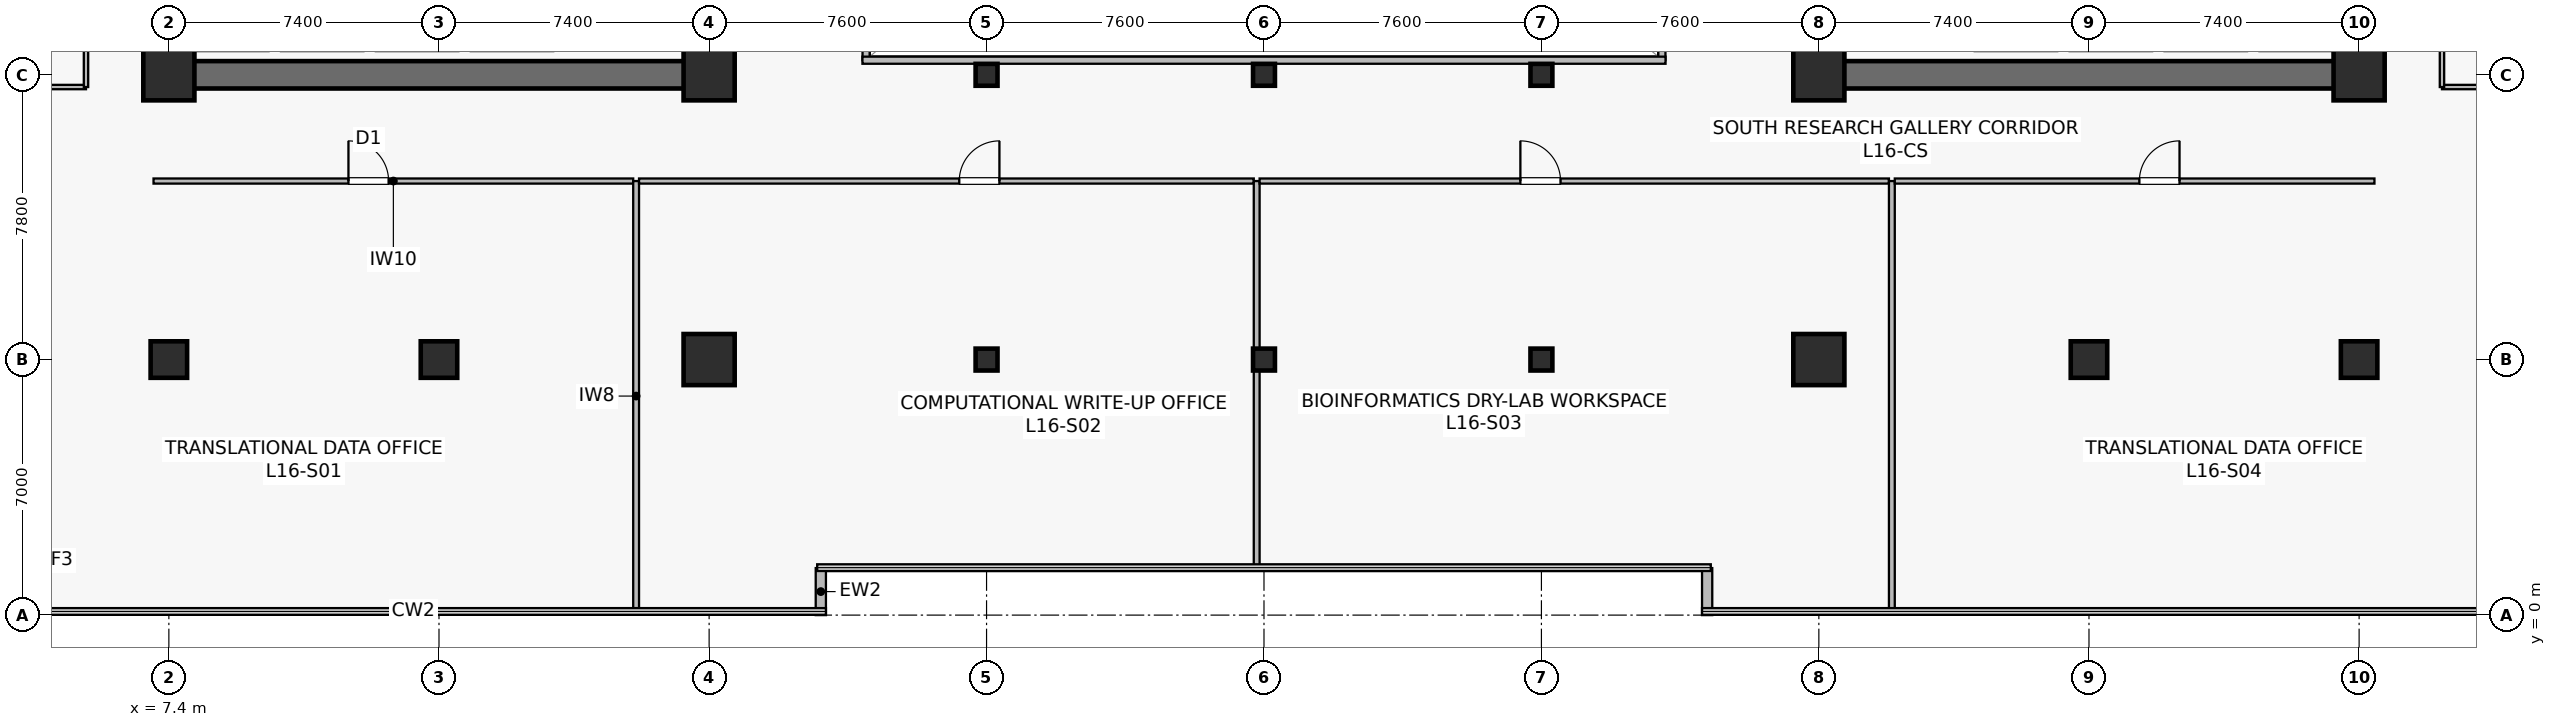
"""IFC4 building model, lengths in metres.
Left out: names, types, materials, properties, quantities, classifications, styles, units other than length and angle.
Written with IfcOpenShell. Run it as: python <this file> out.ifc"""

import sys

from ifc_helpers import new_model, si_unit, direction, frame, frame_2d, origin, origin_2d, place, context, subcontext, project, spatial, rectangle, hollow_rectangle, extrude, source, transform, mapped, element, fill, save


model = new_model("IFC4")
c1 = context("Model", 3, precision=1e-05, world=origin(), true_north=direction((0.0, 1.0)))
c2 = subcontext(c1, "Body", "Model", "MODEL_VIEW")
j1 = project(units=[si_unit("LENGTHUNIT", "METRE"), si_unit("PLANEANGLEUNIT", "RADIAN")], contexts=[c1])
p1 = place(None, origin())
s1 = spatial("IfcSite", under=j1, at=p1, CompositionType="ELEMENT")
p2 = place(p1, origin())
s2 = spatial("IfcBuilding", under=s1, at=p2, CompositionType="ELEMENT")
p3 = place(p2, frame((0.0, 0.0, 66.2)))
s3 = spatial("IfcBuildingStorey", under=s2, at=p3, CompositionType="ELEMENT", Elevation=66.2)
p4 = place(p3, frame((7.025, 14.8, 0.0), z_axis=(0.0, 0.0, 1.0), x_axis=(1.0, 0.0, 0.0)))
e1 = element("IfcWall", 1, at=p4, inside=s3, PredefinedType="SHEAR", context=c2, shape_type="SweptSolid", body=[
    extrude(rectangle(XDim=15.55, YDim=0.75, at=frame_2d((7.775, 0.0))), origin(), (0.0, 0.0, 1.0), 3.78),
])
p5 = place(p3, frame((7.4, 15.175, 0.0), z_axis=(0.0, 0.0, 1.0), x_axis=(0.0, 1.0, 0.0)))
e2 = element("IfcWall", 2, at=p5, inside=s3, PredefinedType="SHEAR", context=c2, shape_type="SweptSolid", body=[
    extrude(rectangle(XDim=18.25, YDim=0.75, at=frame_2d((9.125, 0.0))), origin(), (0.0, 0.0, 1.0), 3.78),
])
p6 = place(p3, frame((22.2, 15.175, 0.0), z_axis=(0.0, 0.0, 1.0), x_axis=(0.0, 1.0, 0.0)))
e3 = element("IfcWall", 3, at=p6, inside=s3, PredefinedType="SHEAR", context=c2, shape_type="SweptSolid", body=[
    extrude(rectangle(XDim=18.25, YDim=0.75, at=frame_2d((9.125, 0.0))), origin(), (0.0, 0.0, 1.0), 3.78),
])
p7 = place(p6, frame((3.375, 0.0, 0.0)))
e4 = element("IfcOpeningElement", 4, at=p7, cuts=e3, PredefinedType="OPENING", context=c2, shape_type="SweptSolid", body=[
    extrude(rectangle(XDim=1.42, YDim=2.2, at=frame_2d((0.71, 1.1))), frame((0.0, 0.385, 0.0), z_axis=(0.0, -1.0, 0.0), x_axis=(1.0, 0.0, 0.0)), (0.0, 0.0, 1.0), 0.77),
])
p8 = place(p3, frame((52.225, 14.8, 0.0), z_axis=(0.0, 0.0, 1.0), x_axis=(1.0, 0.0, 0.0)))
e5 = element("IfcWall", 5, at=p8, inside=s3, PredefinedType="SHEAR", context=c2, shape_type="SweptSolid", body=[
    extrude(rectangle(XDim=15.55, YDim=0.75, at=frame_2d((7.775, 0.0))), origin(), (0.0, 0.0, 1.0), 3.78),
])
p9 = place(p3, frame((52.6, 15.175, 0.0), z_axis=(0.0, 0.0, 1.0), x_axis=(0.0, 1.0, 0.0)))
e6 = element("IfcWall", 6, at=p9, inside=s3, PredefinedType="SHEAR", context=c2, shape_type="SweptSolid", body=[
    extrude(rectangle(XDim=18.25, YDim=0.75, at=frame_2d((9.125, 0.0))), origin(), (0.0, 0.0, 1.0), 3.78),
])
p10 = place(p9, frame((3.375, 0.0, 0.0)))
e7 = element("IfcOpeningElement", 7, at=p10, cuts=e6, PredefinedType="OPENING", context=c2, shape_type="SweptSolid", body=[
    extrude(rectangle(XDim=1.42, YDim=2.2, at=frame_2d((0.71, 1.1))), frame((0.0, 0.385, 0.0), z_axis=(0.0, -1.0, 0.0), x_axis=(1.0, 0.0, 0.0)), (0.0, 0.0, 1.0), 0.77),
])
p11 = place(p3, frame((67.4, 15.175, 0.0), z_axis=(0.0, 0.0, 1.0), x_axis=(0.0, 1.0, 0.0)))
e8 = element("IfcWall", 8, at=p11, inside=s3, PredefinedType="SHEAR", context=c2, shape_type="SweptSolid", body=[
    extrude(rectangle(XDim=18.25, YDim=0.75, at=frame_2d((9.125, 0.0))), origin(), (0.0, 0.0, 1.0), 3.78),
])
m1 = source(origin(), c2, "Body", "SweptSolid", [
    extrude(rectangle(XDim=1.0, YDim=1.0, at=origin_2d()), origin(), (0.0, 0.0, 1.0), 4.1),
])
p12 = place(p3, frame((14.8, 7.0, 0.0), z_axis=(0.0, 0.0, 1.0), x_axis=(1.0, 0.0, 0.0)))
e9 = element("IfcColumn", 9, at=p12, inside=s3, PredefinedType="COLUMN", context=c2, shape_type="MappedRepresentation", body=[
    mapped(m1, transform((0.0, 0.0, 0.0), scale=1.0)),
])
m2 = source(origin(), c2, "Body", "SweptSolid", [
    extrude(rectangle(XDim=1.4, YDim=1.4, at=origin_2d()), origin(), (0.0, 0.0, 1.0), 4.1),
])
for number, where, z_axis, x_axis in (
    (10, (22.2, 7.0, 0.0), (0.0, 0.0, 1.0), (1.0, 0.0, 0.0)),
    (11, (7.4, 14.8, 0.0), (0.0, 0.0, 1.0), (1.0, 0.0, 0.0)),
    (12, (22.2, 14.8, 0.0), (0.0, 0.0, 1.0), (1.0, 0.0, 0.0)),
    (13, (52.6, 7.0, 0.0), (0.0, 0.0, 1.0), (1.0, 0.0, 0.0)),
):
    element("IfcColumn", number, at=place(p3, frame(where, z_axis=z_axis, x_axis=x_axis)), inside=s3, PredefinedType="COLUMN", context=c2, shape_type="MappedRepresentation", body=[
        mapped(m2, transform((0.0, 0.0, 0.0), scale=1.0)),
    ])
p13 = place(p3, frame((60.0, 7.0, 0.0), z_axis=(0.0, 0.0, 1.0), x_axis=(1.0, 0.0, 0.0)))
e14 = element("IfcColumn", 14, at=p13, inside=s3, PredefinedType="COLUMN", context=c2, shape_type="MappedRepresentation", body=[
    mapped(m1, transform((0.0, 0.0, 0.0), scale=1.0)),
])
for number, where, z_axis, x_axis in (
    (15, (52.6, 14.8, 0.0), (0.0, 0.0, 1.0), (1.0, 0.0, 0.0)),
    (16, (67.4, 14.8, 0.0), (0.0, 0.0, 1.0), (1.0, 0.0, 0.0)),
):
    element("IfcColumn", number, at=place(p3, frame(where, z_axis=z_axis, x_axis=x_axis)), inside=s3, PredefinedType="COLUMN", context=c2, shape_type="MappedRepresentation", body=[
        mapped(m2, transform((0.0, 0.0, 0.0), scale=1.0)),
    ])
for number, where, z_axis, x_axis in (
    (17, (7.4, 7.0, 0.0), (0.0, 0.0, 1.0), (1.0, 0.0, 0.0)),
    (18, (67.4, 7.0, 0.0), (0.0, 0.0, 1.0), (1.0, 0.0, 0.0)),
):
    element("IfcColumn", number, at=place(p3, frame(where, z_axis=z_axis, x_axis=x_axis)), inside=s3, PredefinedType="COLUMN", context=c2, shape_type="MappedRepresentation", body=[
        mapped(m1, transform((0.0, 0.0, 0.0), scale=1.0)),
    ])
m3 = source(origin(), c2, "Body", "SweptSolid", [
    extrude(hollow_rectangle(XDim=0.6, YDim=0.6, WallThickness=0.028, at=origin_2d()), origin(), (0.0, 0.0, 1.0), 4.1),
])
for number, where, z_axis, x_axis in (
    (19, (29.8, 7.0, 0.0), (0.0, 0.0, 1.0), (1.0, 0.0, 0.0)),
    (20, (29.8, 14.8, 0.0), (0.0, 0.0, 1.0), (1.0, 0.0, 0.0)),
    (21, (37.4, 7.0, 0.0), (0.0, 0.0, 1.0), (1.0, 0.0, 0.0)),
    (22, (37.4, 14.8, 0.0), (0.0, 0.0, 1.0), (1.0, 0.0, 0.0)),
    (23, (45.0, 7.0, 0.0), (0.0, 0.0, 1.0), (1.0, 0.0, 0.0)),
    (24, (45.0, 14.8, 0.0), (0.0, 0.0, 1.0), (1.0, 0.0, 0.0)),
):
    element("IfcColumn", number, at=place(p3, frame(where, z_axis=z_axis, x_axis=x_axis)), inside=s3, PredefinedType="COLUMN", context=c2, shape_type="MappedRepresentation", body=[
        mapped(m3, transform((0.0, 0.0, 0.0), scale=1.0)),
    ])
for number, where, z_axis, x_axis in (
    (25, (25.26, 0.0, 0.0), (0.0, 0.0, 1.0), (0.0, 1.0, 0.0)),
    (26, (49.54, 1.288, 0.0), (0.0, 0.0, 1.0), (0.0, -1.0, 0.0)),
):
    element("IfcWall", number, at=place(p3, frame(where, z_axis=z_axis, x_axis=x_axis)), inside=s3, PredefinedType="STANDARD", context=c2, shape_type="SweptSolid", body=[
        extrude(rectangle(XDim=1.288, YDim=0.28, at=frame_2d((0.644, 0.0))), origin(), (0.0, 0.0, 1.0), 3.78),
    ])
p14 = place(p3, frame((26.5, 15.2, 0.0), z_axis=(0.0, 0.0, 1.0), x_axis=(0.0, 1.0, 0.0)))
e27 = element("IfcWall", 27, at=p14, inside=s3, PredefinedType="SOLIDWALL", context=c2, shape_type="SweptSolid", body=[
    extrude(rectangle(XDim=18.2, YDim=0.195, at=frame_2d((9.1, 0.0))), origin(), (0.0, 0.0, 1.0), 3.78),
])
p15 = place(p14, frame((1.8, 0.0, 0.9)))
e28 = element("IfcOpeningElement", 28, at=p15, cuts=e27, PredefinedType="OPENING", context=c2, shape_type="SweptSolid", body=[
    extrude(rectangle(XDim=1.5, YDim=1.4, at=frame_2d((0.75, 0.7))), frame((0.0, 0.107, 0.0), z_axis=(0.0, -1.0, 0.0), x_axis=(1.0, 0.0, 0.0)), (0.0, 0.0, 1.0), 0.215),
])
p16 = place(p14, frame((13.2, 0.0, 0.9)))
e29 = element("IfcOpeningElement", 29, at=p16, cuts=e27, PredefinedType="OPENING", context=c2, shape_type="SweptSolid", body=[
    extrude(rectangle(XDim=1.5, YDim=1.4, at=frame_2d((0.75, 0.7))), frame((0.0, 0.107, 0.0), z_axis=(0.0, -1.0, 0.0), x_axis=(1.0, 0.0, 0.0)), (0.0, 0.0, 1.0), 0.215),
])
p17 = place(p3, frame((48.3, 15.2, 0.0), z_axis=(0.0, 0.0, 1.0), x_axis=(0.0, 1.0, 0.0)))
e30 = element("IfcWall", 30, at=p17, inside=s3, PredefinedType="SOLIDWALL", context=c2, shape_type="SweptSolid", body=[
    extrude(rectangle(XDim=18.2, YDim=0.195, at=frame_2d((9.1, 0.0))), origin(), (0.0, 0.0, 1.0), 3.78),
])
p18 = place(p17, frame((1.8, 0.0, 0.9)))
e31 = element("IfcOpeningElement", 31, at=p18, cuts=e30, PredefinedType="OPENING", context=c2, shape_type="SweptSolid", body=[
    extrude(rectangle(XDim=1.5, YDim=1.4, at=frame_2d((0.75, 0.7))), frame((0.0, 0.107, 0.0), z_axis=(0.0, -1.0, 0.0), x_axis=(1.0, 0.0, 0.0)), (0.0, 0.0, 1.0), 0.215),
])
p19 = place(p17, frame((13.2, 0.0, 0.9)))
e32 = element("IfcOpeningElement", 32, at=p19, cuts=e30, PredefinedType="OPENING", context=c2, shape_type="SweptSolid", body=[
    extrude(rectangle(XDim=1.5, YDim=1.4, at=frame_2d((0.75, 0.7))), frame((0.0, 0.107, 0.0), z_axis=(0.0, -1.0, 0.0), x_axis=(1.0, 0.0, 0.0)), (0.0, 0.0, 1.0), 0.215),
])
p20 = place(p3, frame((26.4, 15.2, 0.0), z_axis=(0.0, 0.0, 1.0), x_axis=(1.0, 0.0, 0.0)))
e33 = element("IfcWall", 33, at=p20, inside=s3, PredefinedType="SOLIDWALL", context=c2, shape_type="SweptSolid", body=[
    extrude(rectangle(XDim=22.0, YDim=0.195, at=frame_2d((11.0, 0.0))), origin(), (0.0, 0.0, 1.0), 3.78),
])
p21 = place(p3, frame((6.98, 11.89, 0.0), z_axis=(0.0, 0.0, 1.0), x_axis=(1.0, 0.0, 0.0)))
e34 = element("IfcWall", 34, at=p21, inside=s3, PredefinedType="PARTITIONING", context=c2, shape_type="SweptSolid", body=[
    extrude(rectangle(XDim=13.14, YDim=0.14, at=frame_2d((6.57, 0.0))), origin(), (0.0, 0.0, 1.0), 3.115),
])
p22 = place(p21, frame((5.34, 0.0, 0.0)))
e35 = element("IfcOpeningElement", 35, at=p22, cuts=e34, PredefinedType="OPENING", context=c2, shape_type="SweptSolid", body=[
    extrude(rectangle(XDim=1.1, YDim=2.18, at=frame_2d((0.55, 1.09))), frame((0.0, 0.08, 0.0), z_axis=(0.0, -1.0, 0.0), x_axis=(1.0, 0.0, 0.0)), (0.0, 0.0, 1.0), 0.16),
])
p23 = place(p3, frame((20.2, 0.11, 0.0), z_axis=(0.0, 0.0, 1.0), x_axis=(0.0, 1.0, 0.0)))
e36 = element("IfcWall", 36, at=p23, inside=s3, PredefinedType="PARTITIONING", context=c2, shape_type="SweptSolid", body=[
    extrude(rectangle(XDim=11.78, YDim=0.16, at=frame_2d((5.89, 0.0))), origin(), (0.0, 0.0, 1.0), 3.015),
])
p24 = place(p3, frame((20.28, 11.89, 0.0), z_axis=(0.0, 0.0, 1.0), x_axis=(1.0, 0.0, 0.0)))
e37 = element("IfcWall", 37, at=p24, inside=s3, PredefinedType="PARTITIONING", context=c2, shape_type="SweptSolid", body=[
    extrude(rectangle(XDim=16.84, YDim=0.14, at=frame_2d((8.42, 0.0))), origin(), (0.0, 0.0, 1.0), 3.115),
])
p25 = place(p24, frame((8.772, 0.0, 0.0)))
e38 = element("IfcOpeningElement", 38, at=p25, cuts=e37, PredefinedType="OPENING", context=c2, shape_type="SweptSolid", body=[
    extrude(rectangle(XDim=1.1, YDim=2.18, at=frame_2d((0.55, 1.09))), frame((0.0, 0.08, 0.0), z_axis=(0.0, -1.0, 0.0), x_axis=(1.0, 0.0, 0.0)), (0.0, 0.0, 1.0), 0.16),
])
p26 = place(p3, frame((37.2, 1.31, 0.0), z_axis=(0.0, 0.0, 1.0), x_axis=(0.0, 1.0, 0.0)))
e39 = element("IfcWall", 39, at=p26, inside=s3, PredefinedType="PARTITIONING", context=c2, shape_type="SweptSolid", body=[
    extrude(rectangle(XDim=10.58, YDim=0.16, at=frame_2d((5.29, 0.0))), origin(), (0.0, 0.0, 1.0), 3.015),
])
p27 = place(p3, frame((37.28, 11.89, 0.0), z_axis=(0.0, 0.0, 1.0), x_axis=(1.0, 0.0, 0.0)))
e40 = element("IfcWall", 40, at=p27, inside=s3, PredefinedType="PARTITIONING", context=c2, shape_type="SweptSolid", body=[
    extrude(rectangle(XDim=17.24, YDim=0.14, at=frame_2d((8.62, 0.0))), origin(), (0.0, 0.0, 1.0), 3.115),
])
p28 = place(p27, frame((7.144, 0.0, 0.0)))
e41 = element("IfcOpeningElement", 41, at=p28, cuts=e40, PredefinedType="OPENING", context=c2, shape_type="SweptSolid", body=[
    extrude(rectangle(XDim=1.1, YDim=2.18, at=frame_2d((0.55, 1.09))), frame((0.0, 0.08, 0.0), z_axis=(0.0, -1.0, 0.0), x_axis=(1.0, 0.0, 0.0)), (0.0, 0.0, 1.0), 0.16),
])
p29 = place(p3, frame((54.6, 0.11, 0.0), z_axis=(0.0, 0.0, 1.0), x_axis=(0.0, 1.0, 0.0)))
e42 = element("IfcWall", 42, at=p29, inside=s3, PredefinedType="PARTITIONING", context=c2, shape_type="SweptSolid", body=[
    extrude(rectangle(XDim=11.78, YDim=0.16, at=frame_2d((5.89, 0.0))), origin(), (0.0, 0.0, 1.0), 3.015),
])
p30 = place(p3, frame((54.68, 11.89, 0.0), z_axis=(0.0, 0.0, 1.0), x_axis=(1.0, 0.0, 0.0)))
e43 = element("IfcWall", 43, at=p30, inside=s3, PredefinedType="PARTITIONING", context=c2, shape_type="SweptSolid", body=[
    extrude(rectangle(XDim=13.14, YDim=0.14, at=frame_2d((6.57, 0.0))), origin(), (0.0, 0.0, 1.0), 3.115),
])
p31 = place(p30, frame((6.7, 0.0, 0.0)))
e44 = element("IfcOpeningElement", 44, at=p31, cuts=e43, PredefinedType="OPENING", context=c2, shape_type="SweptSolid", body=[
    extrude(rectangle(XDim=1.1, YDim=2.18, at=frame_2d((0.55, 1.09))), frame((0.0, 0.08, 0.0), z_axis=(0.0, -1.0, 0.0), x_axis=(1.0, 0.0, 0.0)), (0.0, 0.0, 1.0), 0.16),
])
p32 = place(p3, frame((0.11, 14.465, 0.0), z_axis=(0.0, 0.0, 1.0), x_axis=(1.0, 0.0, 0.0)))
e45 = element("IfcWall", 45, at=p32, inside=s3, PredefinedType="PARTITIONING", context=c2, shape_type="SweptSolid", body=[
    extrude(rectangle(XDim=5.02, YDim=0.12, at=frame_2d((2.51, 0.0))), origin(), (0.0, 0.0, 1.0), 3.78),
])
p33 = place(p3, frame((5.13, 14.465, 0.0), z_axis=(0.0, 0.0, 1.0), x_axis=(0.0, 1.0, 0.0)))
e46 = element("IfcWall", 46, at=p33, inside=s3, PredefinedType="PARTITIONING", context=c2, shape_type="SweptSolid", body=[
    extrude(rectangle(XDim=19.67, YDim=0.12, at=frame_2d((9.835, 0.0))), origin(), (0.0, 0.0, 1.0), 3.78),
])
p34 = place(p33, frame((9.385, 0.0, 0.0)))
e47 = element("IfcOpeningElement", 47, at=p34, cuts=e46, PredefinedType="OPENING", context=c2, shape_type="SweptSolid", body=[
    extrude(rectangle(XDim=0.9, YDim=2.1, at=frame_2d((0.45, 1.05))), frame((0.0, 0.07, 0.0), z_axis=(0.0, -1.0, 0.0), x_axis=(1.0, 0.0, 0.0)), (0.0, 0.0, 1.0), 0.14),
])
p35 = place(p3, frame((69.67, 14.465, 0.0), z_axis=(0.0, 0.0, 1.0), x_axis=(1.0, 0.0, 0.0)))
e48 = element("IfcWall", 48, at=p35, inside=s3, PredefinedType="PARTITIONING", context=c2, shape_type="SweptSolid", body=[
    extrude(rectangle(XDim=5.02, YDim=0.12, at=frame_2d((2.51, 0.0))), origin(), (0.0, 0.0, 1.0), 3.78),
])
p36 = place(p3, frame((69.67, 14.465, 0.0), z_axis=(0.0, 0.0, 1.0), x_axis=(0.0, 1.0, 0.0)))
e49 = element("IfcWall", 49, at=p36, inside=s3, PredefinedType="PARTITIONING", context=c2, shape_type="SweptSolid", body=[
    extrude(rectangle(XDim=7.275, YDim=0.12, at=frame_2d((3.637, 0.0))), origin(), (0.0, 0.0, 1.0), 3.78),
])
p37 = place(p36, frame((3.188, 0.0, 0.0)))
e50 = element("IfcOpeningElement", 50, at=p37, cuts=e49, PredefinedType="OPENING", context=c2, shape_type="SweptSolid", body=[
    extrude(rectangle(XDim=0.9, YDim=2.1, at=frame_2d((0.45, 1.05))), frame((0.0, 0.07, 0.0), z_axis=(0.0, -1.0, 0.0), x_axis=(1.0, 0.0, 0.0)), (0.0, 0.0, 1.0), 0.14),
])
m4 = source(origin(), c2, "Body", "SweptSolid", [
    extrude(rectangle(XDim=1.1, YDim=2.18, at=frame_2d((0.55, 1.09))), frame((0.0, 0.025, 0.0), z_axis=(0.0, -1.0, 0.0), x_axis=(1.0, 0.0, 0.0)), (0.0, 0.0, 1.0), 0.05),
])
p38 = place(p22, origin())
e51 = element("IfcDoor", 51, at=p38, inside=s3, OperationType="SINGLE_SWING_LEFT", PredefinedType="DOOR", context=c2, shape_type="MappedRepresentation", body=[
    mapped(m4, transform((0.0, 0.0, 0.0), scale=1.0)),
])
fill(e35, e51)
p39 = place(p25, origin())
e52 = element("IfcDoor", 52, at=p39, inside=s3, OperationType="SINGLE_SWING_RIGHT", PredefinedType="DOOR", context=c2, shape_type="MappedRepresentation", body=[
    mapped(m4, transform((0.0, 0.0, 0.0), scale=1.0)),
])
fill(e38, e52)
p40 = place(p28, origin())
e53 = element("IfcDoor", 53, at=p40, inside=s3, OperationType="SINGLE_SWING_LEFT", PredefinedType="DOOR", context=c2, shape_type="MappedRepresentation", body=[
    mapped(m4, transform((0.0, 0.0, 0.0), scale=1.0)),
])
fill(e41, e53)
p41 = place(p31, origin())
e54 = element("IfcDoor", 54, at=p41, inside=s3, OperationType="SINGLE_SWING_RIGHT", PredefinedType="DOOR", context=c2, shape_type="MappedRepresentation", body=[
    mapped(m4, transform((0.0, 0.0, 0.0), scale=1.0)),
])
fill(e44, e54)
save(model, sys.argv[1])
